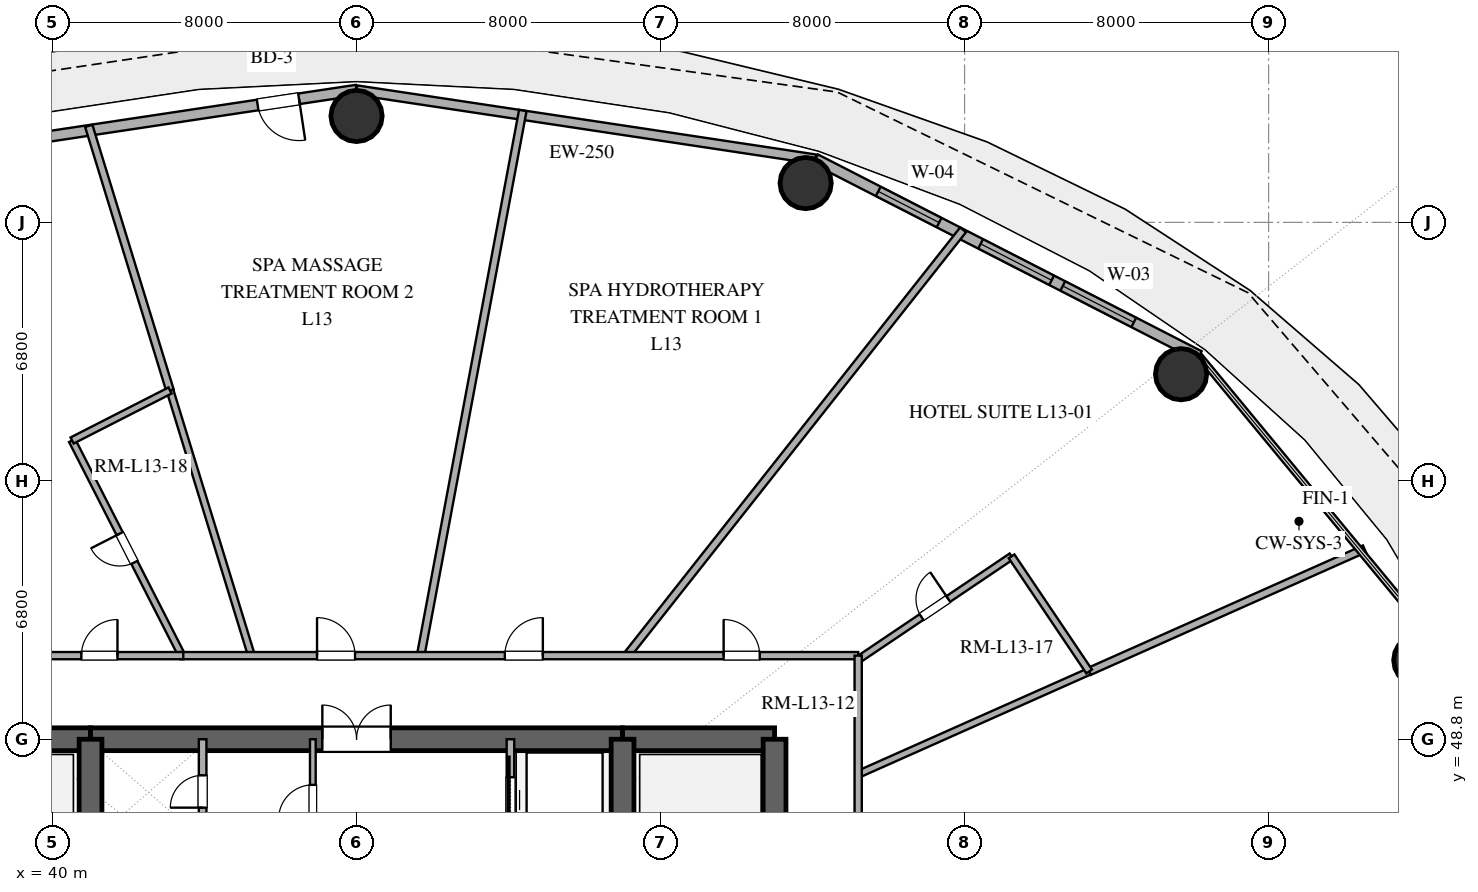
"""IFC4 building model, lengths in metres.
Left out: names, types, materials, properties, quantities, classifications, styles, units other than length and angle.
Written with IfcOpenShell. Run it as: python <this file> out.ifc"""

import sys

from ifc_helpers import new_model, si_unit, direction, frame, frame_2d, origin, origin_2d, place, context, subcontext, project, spatial, rectangle, hollow_circle, extrude, element, fill, save


model = new_model("IFC4")
c1 = context("Model", 3, precision=1e-05, world=origin(), true_north=direction((0.0, 1.0)))
c2 = subcontext(c1, "Body", "Model", "MODEL_VIEW")
j1 = project(units=[si_unit("LENGTHUNIT", "METRE"), si_unit("PLANEANGLEUNIT", "RADIAN")], contexts=[c1])
p1 = place(None, origin())
s1 = spatial("IfcSite", under=j1, at=p1, CompositionType="ELEMENT")
p2 = place(p1, origin())
s2 = spatial("IfcBuilding", under=s1, at=p2, CompositionType="ELEMENT")
p3 = place(p2, frame((0.0, 0.0, 57.0)))
s3 = spatial("IfcBuildingStorey", under=s2, at=p3, CompositionType="ELEMENT", Elevation=57.0)
p4 = place(p3, frame((37.0, 48.8, 0.0), z_axis=(0.0, 0.0, 1.0), x_axis=(1.0, 0.0, 0.0)))
e1 = element("IfcWall", 1, at=p4, inside=s3, PredefinedType="SHEAR", context=c2, shape_type="SweptSolid", body=[
    extrude(rectangle(XDim=4.0, YDim=0.6, at=frame_2d((2.0, 0.0))), origin(), (0.0, 0.0, 1.0), 3.38),
])
p5 = place(p3, frame((41.0, 48.8, 0.0), z_axis=(0.0, 0.0, 1.0), x_axis=(1.0, 0.0, 0.0)))
e2 = element("IfcWall", 2, at=p5, inside=s3, PredefinedType="SHEAR", context=c2, shape_type="SweptSolid", body=[
    extrude(rectangle(XDim=14.0, YDim=0.6, at=frame_2d((7.0, 0.0))), origin(), (0.0, 0.0, 1.0), 3.38),
])
p6 = place(p5, frame((6.1, 0.0, 0.0)))
e3 = element("IfcOpeningElement", 3, at=p6, cuts=e2, PredefinedType="OPENING", context=c2, shape_type="SweptSolid", body=[
    extrude(rectangle(XDim=1.8, YDim=2.25, at=frame_2d((0.9, 1.125))), frame((0.0, 0.31, 0.0), z_axis=(0.0, -1.0, 0.0), x_axis=(1.0, 0.0, 0.0)), (0.0, 0.0, 1.0), 0.62),
])
p7 = place(p3, frame((55.0, 48.8, 0.0), z_axis=(0.0, 0.0, 1.0), x_axis=(1.0, 0.0, 0.0)))
e4 = element("IfcWall", 4, at=p7, inside=s3, PredefinedType="SHEAR", context=c2, shape_type="SweptSolid", body=[
    extrude(rectangle(XDim=4.0, YDim=0.6, at=frame_2d((2.0, 0.0))), origin(), (0.0, 0.0, 1.0), 3.38),
])
p8 = place(p3, frame((59.0, 35.2, 0.0), z_axis=(0.0, 0.0, 1.0), x_axis=(0.0, 1.0, 0.0)))
e5 = element("IfcWall", 5, at=p8, inside=s3, PredefinedType="SHEAR", context=c2, shape_type="SweptSolid", body=[
    extrude(rectangle(XDim=13.6, YDim=0.6, at=frame_2d((6.8, 0.0))), origin(), (0.0, 0.0, 1.0), 3.38),
])
p9 = place(p8, frame((1.5, 0.0, 0.0)))
e6 = element("IfcOpeningElement", 6, at=p9, cuts=e5, PredefinedType="OPENING", context=c2, shape_type="SweptSolid", body=[
    extrude(rectangle(XDim=1.2, YDim=2.15, at=frame_2d((0.6, 1.075))), frame((0.0, 0.31, 0.0), z_axis=(0.0, -1.0, 0.0), x_axis=(1.0, 0.0, 0.0)), (0.0, 0.0, 1.0), 0.62),
])
p10 = place(p3, frame((41.0, 35.2, 0.0), z_axis=(0.0, 0.0, 1.0), x_axis=(0.0, 1.0, 0.0)))
e7 = element("IfcWall", 7, at=p10, inside=s3, PredefinedType="SHEAR", context=c2, shape_type="SweptSolid", body=[
    extrude(rectangle(XDim=13.6, YDim=0.6, at=frame_2d((6.8, 0.0))), origin(), (0.0, 0.0, 1.0), 3.38),
])
p11 = place(p10, frame((1.15, 0.0, 0.0)))
e8 = element("IfcOpeningElement", 8, at=p11, cuts=e7, PredefinedType="OPENING", context=c2, shape_type="SweptSolid", body=[
    extrude(rectangle(XDim=1.1, YDim=2.2, at=frame_2d((0.55, 1.1))), frame((0.0, 0.31, 0.0), z_axis=(0.0, -1.0, 0.0), x_axis=(1.0, 0.0, 0.0)), (0.0, 0.0, 1.0), 0.62),
])
p12 = place(p3, frame((55.0, 35.2, 0.0), z_axis=(0.0, 0.0, 1.0), x_axis=(0.0, 1.0, 0.0)))
e9 = element("IfcWall", 9, at=p12, inside=s3, PredefinedType="SHEAR", context=c2, shape_type="SweptSolid", body=[
    extrude(rectangle(XDim=13.6, YDim=0.6, at=frame_2d((6.8, 0.0))), origin(), (0.0, 0.0, 1.0), 3.38),
])
p13 = place(p12, frame((1.15, 0.0, 0.0)))
e10 = element("IfcOpeningElement", 10, at=p13, cuts=e9, PredefinedType="OPENING", context=c2, shape_type="SweptSolid", body=[
    extrude(rectangle(XDim=1.1, YDim=2.2, at=frame_2d((0.55, 1.1))), frame((0.0, 0.31, 0.0), z_axis=(0.0, -1.0, 0.0), x_axis=(1.0, 0.0, 0.0)), (0.0, 0.0, 1.0), 0.62),
])
for number, where, z_axis, x_axis in (
    (11, (75.966, 50.878, 0.0), (0.0, 0.0, 1.0), (1.0, 0.0, 0.0)),
    (12, (69.697, 58.405, 0.0), (0.0, 0.0, 1.0), (1.0, 0.0, 0.0)),
    (13, (59.818, 63.434, 0.0), (0.0, 0.0, 1.0), (1.0, 0.0, 0.0)),
    (14, (48.0, 65.2, 0.0), (0.0, 0.0, 1.0), (1.0, 0.0, 0.0)),
):
    element("IfcColumn", number, at=place(p3, frame(where, z_axis=z_axis, x_axis=x_axis)), inside=s3, PredefinedType="COLUMN", context=c2, shape_type="SweptSolid", body=[
        extrude(hollow_circle(Radius=0.675, WallThickness=0.036, at=origin_2d()), origin(), (0.0, 0.0, 1.0), 3.38),
    ])
p14 = place(p3, frame((70.174, 58.886, 0.0), z_axis=(0.0, 0.0, 1.0), x_axis=(-0.889853976658, 0.456245438581, 0.0)))
e15 = element("IfcWall", 15, at=p14, inside=s3, PredefinedType="SOLIDWALL", context=c2, shape_type="SweptSolid", body=[
    extrude(rectangle(XDim=11.346, YDim=0.28, at=frame_2d((5.673, 0.0))), origin(), (0.0, 0.0, 1.0), 3.38),
])
p15 = place(p14, frame((1.935, 0.0, 0.85)))
e16 = element("IfcOpeningElement", 16, at=p15, cuts=e15, PredefinedType="OPENING", context=c2, shape_type="SweptSolid", body=[
    extrude(rectangle(XDim=2.1, YDim=2.2, at=frame_2d((1.05, 1.1))), frame((0.0, 0.15, 0.0), z_axis=(0.0, -1.0, 0.0), x_axis=(1.0, 0.0, 0.0)), (0.0, 0.0, 1.0), 0.3),
])
p16 = place(p14, frame((4.364, 0.0, 0.85)))
e17 = element("IfcOpeningElement", 17, at=p16, cuts=e15, PredefinedType="OPENING", context=c2, shape_type="SweptSolid", body=[
    extrude(rectangle(XDim=2.1, YDim=2.2, at=frame_2d((1.05, 1.1))), frame((0.0, 0.15, 0.0), z_axis=(0.0, -1.0, 0.0), x_axis=(1.0, 0.0, 0.0)), (0.0, 0.0, 1.0), 0.3),
])
p17 = place(p14, frame((7.692, 0.0, 0.85)))
e18 = element("IfcOpeningElement", 18, at=p17, cuts=e15, PredefinedType="OPENING", context=c2, shape_type="SweptSolid", body=[
    extrude(rectangle(XDim=1.8, YDim=2.2, at=frame_2d((0.9, 1.1))), frame((0.0, 0.15, 0.0), z_axis=(0.0, -1.0, 0.0), x_axis=(1.0, 0.0, 0.0)), (0.0, 0.0, 1.0), 0.3),
])
p18 = place(p3, frame((60.078, 64.062, 0.0), z_axis=(0.0, 0.0, 1.0), x_axis=(-0.988864835849, 0.148816452121, 0.0)))
e19 = element("IfcWall", 19, at=p18, inside=s3, PredefinedType="SOLIDWALL", context=c2, shape_type="SweptSolid", body=[
    extrude(rectangle(XDim=12.214, YDim=0.25, at=frame_2d((6.107, 0.0))), origin(), (0.0, 0.0, 1.0), 3.38),
])
p19 = place(p3, frame((48.0, 65.88, 0.0), z_axis=(0.0, 0.0, 1.0), x_axis=(-0.988864835849, -0.148816452121, 0.0)))
e20 = element("IfcWall", 20, at=p19, inside=s3, PredefinedType="SOLIDWALL", context=c2, shape_type="SweptSolid", body=[
    extrude(rectangle(XDim=12.214, YDim=0.28, at=frame_2d((6.107, 0.0))), origin(), (0.0, 0.0, 1.0), 3.38),
])
p20 = place(p19, frame((1.531, 0.0, 0.0)))
e21 = element("IfcOpeningElement", 21, at=p20, cuts=e20, PredefinedType="OPENING", context=c2, shape_type="SweptSolid", body=[
    extrude(rectangle(XDim=1.1, YDim=2.25, at=frame_2d((0.55, 1.125))), frame((0.0, 0.15, 0.0), z_axis=(0.0, -1.0, 0.0), x_axis=(1.0, 0.0, 0.0)), (0.0, 0.0, 1.0), 0.3),
])
p21 = place(p19, frame((8.254, 0.0, 0.85)))
e22 = element("IfcOpeningElement", 22, at=p21, cuts=e20, PredefinedType="OPENING", context=c2, shape_type="SweptSolid", body=[
    extrude(rectangle(XDim=1.5, YDim=2.0, at=frame_2d((0.75, 1.0))), frame((0.0, 0.15, 0.0), z_axis=(0.0, -1.0, 0.0), x_axis=(1.0, 0.0, 0.0)), (0.0, 0.0, 1.0), 0.3),
])
p22 = place(p3, frame((43.95, 46.2, 0.0), z_axis=(0.0, 0.0, 1.0), x_axis=(0.0, 1.0, 0.0)))
e23 = element("IfcWall", 23, at=p22, inside=s3, PredefinedType="SOLIDWALL", context=c2, shape_type="SweptSolid", body=[
    extrude(rectangle(XDim=2.6, YDim=0.2, at=frame_2d((1.3, 0.0))), origin(), (0.0, 0.0, 1.0), 2.74),
])
p23 = place(p22, frame((0.8, 0.0, 0.0)))
e24 = element("IfcOpeningElement", 24, at=p23, cuts=e23, PredefinedType="OPENING", context=c2, shape_type="SweptSolid", body=[
    extrude(rectangle(XDim=0.85, YDim=2.15, at=frame_2d((0.425, 1.075))), frame((0.0, 0.11, 0.0), z_axis=(0.0, -1.0, 0.0), x_axis=(1.0, 0.0, 0.0)), (0.0, 0.0, 1.0), 0.22),
])
p24 = place(p3, frame((52.05, 38.4, 0.0), z_axis=(0.0, 0.0, 1.0), x_axis=(0.0, 1.0, 0.0)))
e25 = element("IfcWall", 25, at=p24, inside=s3, PredefinedType="SOLIDWALL", context=c2, shape_type="SweptSolid", body=[
    extrude(rectangle(XDim=10.4, YDim=0.2, at=frame_2d((5.2, 0.0))), origin(), (0.0, 0.0, 1.0), 2.74),
])
p25 = place(p24, frame((8.2, 0.0, 0.0)))
e26 = element("IfcOpeningElement", 26, at=p25, cuts=e25, PredefinedType="OPENING", context=c2, shape_type="SweptSolid", body=[
    extrude(rectangle(XDim=1.2, YDim=2.2, at=frame_2d((0.6, 1.1))), frame((0.0, 0.11, 0.0), z_axis=(0.0, -1.0, 0.0), x_axis=(1.0, 0.0, 0.0)), (0.0, 0.0, 1.0), 0.22),
])
p26 = place(p3, frame((46.85, 45.65, 0.0), z_axis=(0.0, 0.0, 1.0), x_axis=(0.0, 1.0, 0.0)))
e27 = element("IfcWall", 27, at=p26, inside=s3, PredefinedType="PARTITIONING", context=c2, shape_type="SweptSolid", body=[
    extrude(rectangle(XDim=3.15, YDim=0.15, at=frame_2d((1.575, 0.0))), origin(), (0.0, 0.0, 1.0), 2.74),
])
p27 = place(p26, frame((1.05, 0.0, 0.0)))
e28 = element("IfcOpeningElement", 28, at=p27, cuts=e27, PredefinedType="OPENING", context=c2, shape_type="SweptSolid", body=[
    extrude(rectangle(XDim=0.9, YDim=2.15, at=frame_2d((0.45, 1.075))), frame((0.0, 0.085, 0.0), z_axis=(0.0, -1.0, 0.0), x_axis=(1.0, 0.0, 0.0)), (0.0, 0.0, 1.0), 0.17),
])
p28 = place(p3, frame((52.375, 65.343, 0.0), z_axis=(0.0, 0.0, 1.0), x_axis=(-0.184219844734, -0.982885063884, 0.0)))
e29 = element("IfcWall", 29, at=p28, inside=s3, PredefinedType="PARTITIONING", context=c2, shape_type="SweptSolid", body=[
    extrude(rectangle(XDim=14.593, YDim=0.2, at=frame_2d((7.296, 0.0))), origin(), (0.0, 0.0, 1.0), 2.74),
])
p29 = place(p3, frame((63.96, 62.204, 0.0), z_axis=(0.0, 0.0, 1.0), x_axis=(-0.619889304847, -0.784689269543, 0.0)))
e30 = element("IfcWall", 30, at=p29, inside=s3, PredefinedType="PARTITIONING", context=c2, shape_type="SweptSolid", body=[
    extrude(rectangle(XDim=14.278, YDim=0.2, at=frame_2d((7.139, 0.0))), origin(), (0.0, 0.0, 1.0), 2.74),
])
p30 = place(p3, frame((74.523, 53.809, 0.0), z_axis=(0.0, 0.0, 1.0), x_axis=(-0.913542208968, -0.40674393964, 0.0)))
e31 = element("IfcWall", 31, at=p30, inside=s3, PredefinedType="PARTITIONING", context=c2, shape_type="SweptSolid", body=[
    extrude(rectangle(XDim=7.93, YDim=0.2, at=frame_2d((3.965, 0.0))), origin(), (0.0, 0.0, 1.0), 2.74),
])
p31 = place(p3, frame((43.092, 57.976, 0.0), z_axis=(0.0, 0.0, 1.0), x_axis=(0.293648581073, -0.95591344317, 0.0)))
e32 = element("IfcWall", 32, at=p31, inside=s3, PredefinedType="PLUMBINGWALL", context=c2, shape_type="SweptSolid", body=[
    extrude(rectangle(XDim=7.298, YDim=0.18, at=frame_2d((3.649, 0.0))), origin(), (0.0, 0.0, 1.0), 2.74),
])
p32 = place(p3, frame((40.953, 64.939, 0.0), z_axis=(0.0, 0.0, 1.0), x_axis=(0.293635973675, -0.955917315966, 0.0)))
e33 = element("IfcWall", 33, at=p32, inside=s3, PredefinedType="PARTITIONING", context=c2, shape_type="SweptSolid", body=[
    extrude(rectangle(XDim=7.284, YDim=0.2, at=frame_2d((3.642, 0.0))), origin(), (0.0, 0.0, 1.0), 2.74),
])
p33 = place(p3, frame((67.278, 50.583, 0.0), z_axis=(0.0, 0.0, 1.0), x_axis=(-0.913551093465, -0.406723984575, 0.0)))
e34 = element("IfcWall", 34, at=p33, inside=s3, PredefinedType="PLUMBINGWALL", context=c2, shape_type="SweptSolid", body=[
    extrude(rectangle(XDim=6.653, YDim=0.18, at=frame_2d((3.327, 0.0))), origin(), (0.0, 0.0, 1.0), 2.74),
])
p34 = place(p3, frame((43.405, 51.0, 0.0), z_axis=(0.0, 0.0, 1.0), x_axis=(-0.454680565764, 0.890654581259, 0.0)))
e35 = element("IfcWall", 35, at=p34, inside=s3, PredefinedType="PLUMBINGWALL", context=c2, shape_type="SweptSolid", body=[
    extrude(rectangle(XDim=6.356, YDim=0.18, at=frame_2d((3.178, 0.0))), origin(), (0.0, 0.0, 1.0), 2.74),
])
p35 = place(p34, frame((2.753, 0.0, 0.0)))
e36 = element("IfcOpeningElement", 36, at=p35, cuts=e35, PredefinedType="OPENING", context=c2, shape_type="SweptSolid", body=[
    extrude(rectangle(XDim=0.85, YDim=2.1, at=frame_2d((0.425, 1.05))), frame((0.0, 0.1, 0.0), z_axis=(0.0, -1.0, 0.0), x_axis=(1.0, 0.0, 0.0)), (0.0, 0.0, 1.0), 0.2),
])
p36 = place(p3, frame((43.369, 51.0, 0.0), z_axis=(0.0, 0.0, 1.0), x_axis=(1.0, 0.0, 0.0)))
e37 = element("IfcWall", 37, at=p36, inside=s3, PredefinedType="PARTITIONING", context=c2, shape_type="SweptSolid", body=[
    extrude(rectangle(XDim=17.831, YDim=0.19, at=frame_2d((8.916, 0.0))), origin(), (0.0, 0.0, 1.0), 2.74),
])
p37 = place(p36, frame((14.29, 0.0, 0.0)))
e38 = element("IfcOpeningElement", 38, at=p37, cuts=e37, PredefinedType="OPENING", context=c2, shape_type="SweptSolid", body=[
    extrude(rectangle(XDim=0.95, YDim=2.15, at=frame_2d((0.475, 1.075))), frame((0.0, 0.105, 0.0), z_axis=(0.0, -1.0, 0.0), x_axis=(1.0, 0.0, 0.0)), (0.0, 0.0, 1.0), 0.21),
])
p38 = place(p36, frame((8.533, 0.0, 0.0)))
e39 = element("IfcOpeningElement", 39, at=p38, cuts=e37, PredefinedType="OPENING", context=c2, shape_type="SweptSolid", body=[
    extrude(rectangle(XDim=1.0, YDim=2.2, at=frame_2d((0.5, 1.1))), frame((0.0, 0.105, 0.0), z_axis=(0.0, -1.0, 0.0), x_axis=(1.0, 0.0, 0.0)), (0.0, 0.0, 1.0), 0.21),
])
p39 = place(p36, frame((3.591, 0.0, 0.0)))
e40 = element("IfcOpeningElement", 40, at=p39, cuts=e37, PredefinedType="OPENING", context=c2, shape_type="SweptSolid", body=[
    extrude(rectangle(XDim=1.0, YDim=2.2, at=frame_2d((0.5, 1.1))), frame((0.0, 0.105, 0.0), z_axis=(0.0, -1.0, 0.0), x_axis=(1.0, 0.0, 0.0)), (0.0, 0.0, 1.0), 0.21),
])
p40 = place(p3, frame((61.2, 50.893, 0.0), z_axis=(0.0, 0.0, 1.0), x_axis=(0.829362933151, 0.558710233587, 0.0)))
e41 = element("IfcWall", 41, at=p40, inside=s3, PredefinedType="PLUMBINGWALL", context=c2, shape_type="SweptSolid", body=[
    extrude(rectangle(XDim=4.867, YDim=0.18, at=frame_2d((2.434, 0.0))), origin(), (0.0, 0.0, 1.0), 2.74),
])
p41 = place(p40, frame((2.009, 0.0, 0.0)))
e42 = element("IfcOpeningElement", 42, at=p41, cuts=e41, PredefinedType="OPENING", context=c2, shape_type="SweptSolid", body=[
    extrude(rectangle(XDim=0.85, YDim=2.1, at=frame_2d((0.425, 1.05))), frame((0.0, 0.1, 0.0), z_axis=(0.0, -1.0, 0.0), x_axis=(1.0, 0.0, 0.0)), (0.0, 0.0, 1.0), 0.2),
])
p42 = place(p3, frame((61.2, 51.0, 0.0), z_axis=(0.0, 0.0, 1.0), x_axis=(0.0, -1.0, 0.0)))
e43 = element("IfcWall", 43, at=p42, inside=s3, PredefinedType="PARTITIONING", context=c2, shape_type="SweptSolid", body=[
    extrude(rectangle(XDim=9.852, YDim=0.19, at=frame_2d((4.926, 0.0))), origin(), (0.0, 0.0, 1.0), 2.74),
])
p43 = place(p42, frame((4.859, 0.0, 0.0)))
e44 = element("IfcOpeningElement", 44, at=p43, cuts=e43, PredefinedType="OPENING", context=c2, shape_type="SweptSolid", body=[
    extrude(rectangle(XDim=0.95, YDim=2.15, at=frame_2d((0.475, 1.075))), frame((0.0, 0.105, 0.0), z_axis=(0.0, -1.0, 0.0), x_axis=(1.0, 0.0, 0.0)), (0.0, 0.0, 1.0), 0.21),
])
p44 = place(p3, frame((34.8, 51.0, 0.0), z_axis=(0.0, 0.0, 1.0), x_axis=(1.0, 0.0, 0.0)))
e45 = element("IfcWall", 45, at=p44, inside=s3, PredefinedType="PARTITIONING", context=c2, shape_type="SweptSolid", body=[
    extrude(rectangle(XDim=8.641, YDim=0.19, at=frame_2d((4.32, 0.0))), origin(), (0.0, 0.0, 1.0), 2.74),
])
p45 = place(p44, frame((5.959, 0.0, 0.0)))
e46 = element("IfcOpeningElement", 46, at=p45, cuts=e45, PredefinedType="OPENING", context=c2, shape_type="SweptSolid", body=[
    extrude(rectangle(XDim=0.95, YDim=2.15, at=frame_2d((0.475, 1.075))), frame((0.0, 0.105, 0.0), z_axis=(0.0, -1.0, 0.0), x_axis=(1.0, 0.0, 0.0)), (0.0, 0.0, 1.0), 0.21),
])
p46 = place(p3, frame((65.237, 53.613, 0.0), z_axis=(0.0, 0.0, 1.0), x_axis=(0.558749555988, -0.829336441791, 0.0)))
e47 = element("IfcWall", 47, at=p46, inside=s3, PredefinedType="PLUMBINGWALL", context=c2, shape_type="SweptSolid", body=[
    extrude(rectangle(XDim=3.653, YDim=0.18, at=frame_2d((1.827, 0.0))), origin(), (0.0, 0.0, 1.0), 2.74),
])
p47 = place(p3, frame((40.515, 56.661, 0.0), z_axis=(0.0, 0.0, 1.0), x_axis=(0.890666340124, 0.454657531083, 0.0)))
e48 = element("IfcWall", 48, at=p47, inside=s3, PredefinedType="PLUMBINGWALL", context=c2, shape_type="SweptSolid", body=[
    extrude(rectangle(XDim=2.893, YDim=0.18, at=frame_2d((1.447, 0.0))), origin(), (0.0, 0.0, 1.0), 2.74),
])
p48 = place(p15, origin())
e49 = element("IfcWindow", 49, at=p48, inside=s3, PartitioningType="SINGLE_PANEL", PredefinedType="WINDOW", context=c2, shape_type="SweptSolid", body=[
    extrude(rectangle(XDim=2.1, YDim=2.2, at=frame_2d((1.05, 1.1))), frame((0.0, 0.03, 0.0), z_axis=(0.0, -1.0, 0.0), x_axis=(1.0, 0.0, 0.0)), (0.0, 0.0, 1.0), 0.06),
])
fill(e16, e49)
p49 = place(p16, origin())
e50 = element("IfcWindow", 50, at=p49, inside=s3, PartitioningType="SINGLE_PANEL", PredefinedType="WINDOW", context=c2, shape_type="SweptSolid", body=[
    extrude(rectangle(XDim=2.1, YDim=2.2, at=frame_2d((1.05, 1.1))), frame((0.0, 0.03, 0.0), z_axis=(0.0, -1.0, 0.0), x_axis=(1.0, 0.0, 0.0)), (0.0, 0.0, 1.0), 0.06),
])
fill(e17, e50)
p50 = place(p17, origin())
e51 = element("IfcWindow", 51, at=p50, inside=s3, PartitioningType="SINGLE_PANEL", PredefinedType="WINDOW", context=c2, shape_type="SweptSolid", body=[
    extrude(rectangle(XDim=1.8, YDim=2.2, at=frame_2d((0.9, 1.1))), frame((0.0, 0.03, 0.0), z_axis=(0.0, -1.0, 0.0), x_axis=(1.0, 0.0, 0.0)), (0.0, 0.0, 1.0), 0.06),
])
fill(e18, e51)
p51 = place(p20, origin())
e52 = element("IfcDoor", 52, at=p51, inside=s3, OperationType="SINGLE_SWING_LEFT", PredefinedType="DOOR", context=c2, shape_type="SweptSolid", body=[
    extrude(rectangle(XDim=1.1, YDim=2.25, at=frame_2d((0.55, 1.125))), frame((0.0, 0.025, 0.0), z_axis=(0.0, -1.0, 0.0), x_axis=(1.0, 0.0, 0.0)), (0.0, 0.0, 1.0), 0.05),
])
fill(e21, e52)
p52 = place(p6, origin())
e53 = element("IfcDoor", 53, at=p52, inside=s3, OperationType="DOUBLE_DOOR_SINGLE_SWING", PredefinedType="DOOR", context=c2, shape_type="SweptSolid", body=[
    extrude(rectangle(XDim=1.8, YDim=2.25, at=frame_2d((0.9, 1.125))), frame((0.0, 0.025, 0.0), z_axis=(0.0, -1.0, 0.0), x_axis=(1.0, 0.0, 0.0)), (0.0, 0.0, 1.0), 0.05),
])
fill(e3, e53)
p53 = place(p23, origin())
e54 = element("IfcDoor", 54, at=p53, inside=s3, OperationType="SINGLE_SWING_LEFT", PredefinedType="DOOR", context=c2, shape_type="SweptSolid", body=[
    extrude(rectangle(XDim=0.85, YDim=2.15, at=frame_2d((0.425, 1.075))), frame((0.0, 0.025, 0.0), z_axis=(0.0, -1.0, 0.0), x_axis=(1.0, 0.0, 0.0)), (0.0, 0.0, 1.0), 0.05),
])
fill(e24, e54)
p54 = place(p25, origin())
e55 = element("IfcDoor", 55, at=p54, inside=s3, OperationType="SLIDING_TO_RIGHT", PredefinedType="DOOR", context=c2, shape_type="SweptSolid", body=[
    extrude(rectangle(XDim=1.2, YDim=2.2, at=frame_2d((0.6, 1.1))), frame((0.0, 0.025, 0.0), z_axis=(0.0, -1.0, 0.0), x_axis=(1.0, 0.0, 0.0)), (0.0, 0.0, 1.0), 0.05),
])
fill(e26, e55)
p55 = place(p27, origin())
e56 = element("IfcDoor", 56, at=p55, inside=s3, OperationType="SINGLE_SWING_LEFT", PredefinedType="DOOR", context=c2, shape_type="SweptSolid", body=[
    extrude(rectangle(XDim=0.9, YDim=2.15, at=frame_2d((0.45, 1.075))), frame((0.0, 0.025, 0.0), z_axis=(0.0, -1.0, 0.0), x_axis=(1.0, 0.0, 0.0)), (0.0, 0.0, 1.0), 0.05),
])
fill(e28, e56)
p56 = place(p35, origin())
e57 = element("IfcDoor", 57, at=p56, inside=s3, OperationType="SINGLE_SWING_RIGHT", PredefinedType="DOOR", context=c2, shape_type="SweptSolid", body=[
    extrude(rectangle(XDim=0.85, YDim=2.1, at=frame_2d((0.425, 1.05))), frame((0.0, 0.025, 0.0), z_axis=(0.0, -1.0, 0.0), x_axis=(1.0, 0.0, 0.0)), (0.0, 0.0, 1.0), 0.05),
])
fill(e36, e57)
p57 = place(p37, origin())
e58 = element("IfcDoor", 58, at=p57, inside=s3, OperationType="SINGLE_SWING_LEFT", PredefinedType="DOOR", context=c2, shape_type="SweptSolid", body=[
    extrude(rectangle(XDim=0.95, YDim=2.15, at=frame_2d((0.475, 1.075))), frame((0.0, 0.025, 0.0), z_axis=(0.0, -1.0, 0.0), x_axis=(1.0, 0.0, 0.0)), (0.0, 0.0, 1.0), 0.05),
])
fill(e38, e58)
p58 = place(p38, origin())
e59 = element("IfcDoor", 59, at=p58, inside=s3, OperationType="SINGLE_SWING_RIGHT", PredefinedType="DOOR", context=c2, shape_type="SweptSolid", body=[
    extrude(rectangle(XDim=1.0, YDim=2.2, at=frame_2d((0.5, 1.1))), frame((0.0, 0.025, 0.0), z_axis=(0.0, -1.0, 0.0), x_axis=(1.0, 0.0, 0.0)), (0.0, 0.0, 1.0), 0.05),
])
fill(e39, e59)
p59 = place(p39, origin())
e60 = element("IfcDoor", 60, at=p59, inside=s3, OperationType="SINGLE_SWING_LEFT", PredefinedType="DOOR", context=c2, shape_type="SweptSolid", body=[
    extrude(rectangle(XDim=1.0, YDim=2.2, at=frame_2d((0.5, 1.1))), frame((0.0, 0.025, 0.0), z_axis=(0.0, -1.0, 0.0), x_axis=(1.0, 0.0, 0.0)), (0.0, 0.0, 1.0), 0.05),
])
fill(e40, e60)
p60 = place(p41, origin())
e61 = element("IfcDoor", 61, at=p60, inside=s3, OperationType="SINGLE_SWING_RIGHT", PredefinedType="DOOR", context=c2, shape_type="SweptSolid", body=[
    extrude(rectangle(XDim=0.85, YDim=2.1, at=frame_2d((0.425, 1.05))), frame((0.0, 0.025, 0.0), z_axis=(0.0, -1.0, 0.0), x_axis=(1.0, 0.0, 0.0)), (0.0, 0.0, 1.0), 0.05),
])
fill(e42, e61)
p61 = place(p45, origin())
e62 = element("IfcDoor", 62, at=p61, inside=s3, OperationType="SINGLE_SWING_RIGHT", PredefinedType="DOOR", context=c2, shape_type="SweptSolid", body=[
    extrude(rectangle(XDim=0.95, YDim=2.15, at=frame_2d((0.475, 1.075))), frame((0.0, 0.025, 0.0), z_axis=(0.0, -1.0, 0.0), x_axis=(1.0, 0.0, 0.0)), (0.0, 0.0, 1.0), 0.05),
])
fill(e46, e62)
save(model, sys.argv[1])
